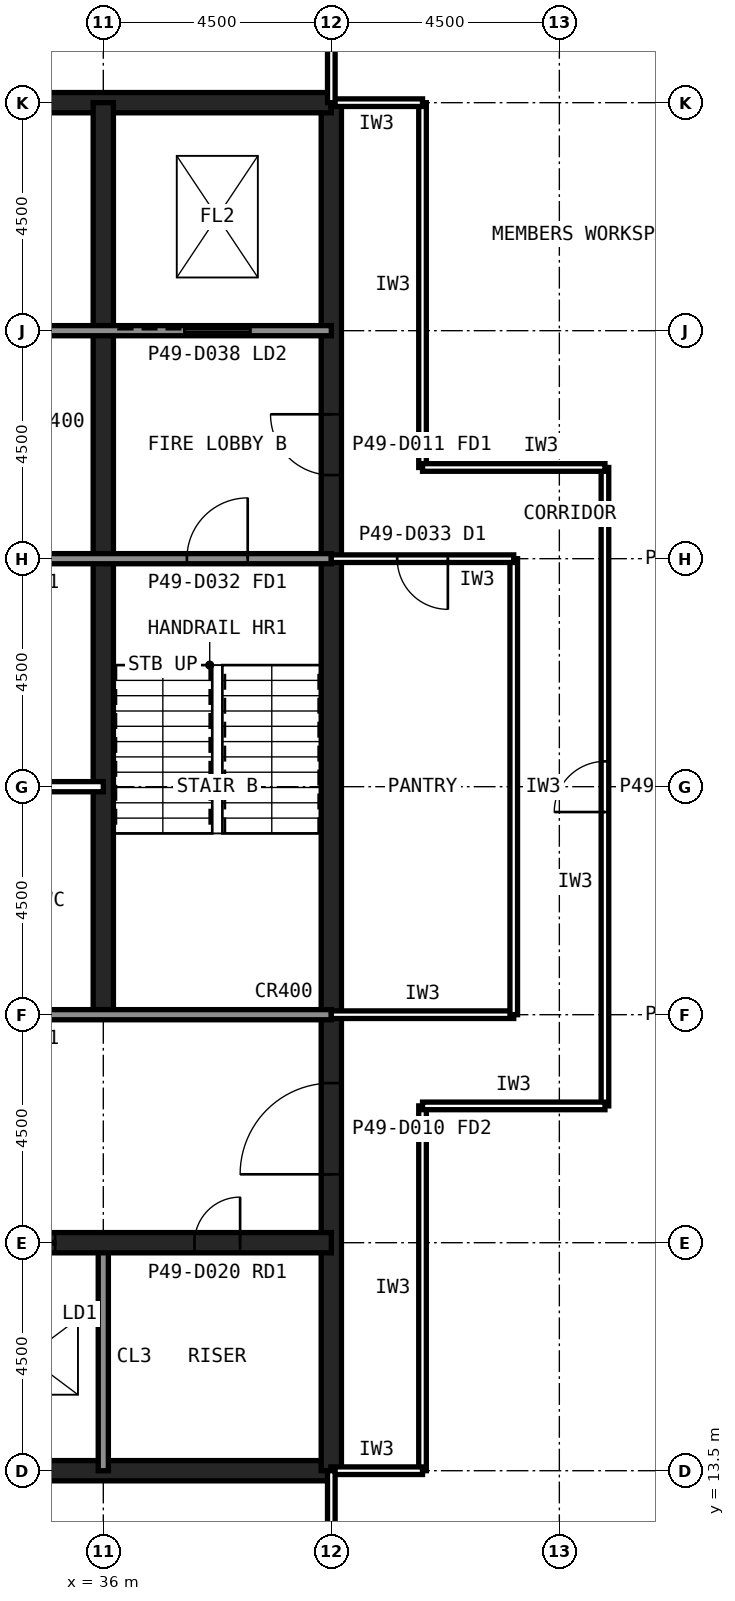
"""IFC4 building model, lengths in metres.
Left out: names, types, materials, properties, quantities, classifications, styles, units other than length and angle.
Written with IfcOpenShell. Run it as: python <this file> out.ifc"""

import sys

from ifc_helpers import new_model, si_unit, direction, frame, frame_2d, origin, place, context, subcontext, project, spatial, rectangle, extrude, element, fill, save


model = new_model("IFC4")
c1 = context("Model", 3, precision=1e-05, world=origin(), true_north=direction((0.0, 1.0)))
c2 = subcontext(c1, "Body", "Model", "MODEL_VIEW")
j1 = project(units=[si_unit("LENGTHUNIT", "METRE"), si_unit("PLANEANGLEUNIT", "RADIAN")], contexts=[c1])
p1 = place(None, origin())
s1 = spatial("IfcSite", under=j1, at=p1, CompositionType="ELEMENT")
p2 = place(p1, origin())
s2 = spatial("IfcBuilding", under=s1, at=p2, CompositionType="ELEMENT")
p3 = place(p2, frame((0.0, 0.0, 210.6)))
s3 = spatial("IfcBuildingStorey", under=s2, at=p3, CompositionType="ELEMENT", Elevation=210.6)
p4 = place(p3, frame((13.5, 13.5, 0.0), z_axis=(0.0, 0.0, 1.0), x_axis=(1.0, 0.0, 0.0)))
e1 = element("IfcWall", 1, at=p4, inside=s3, PredefinedType="SHEAR", context=c2, shape_type="SweptSolid", body=[
    extrude(rectangle(XDim=27.0, YDim=0.4, at=frame_2d((13.5, 0.0))), origin(), (0.0, 0.0, 1.0), 4.0),
])
p5 = place(p3, frame((40.5, 13.5, 0.0), z_axis=(0.0, 0.0, 1.0), x_axis=(0.0, 1.0, 0.0)))
e2 = element("IfcWall", 2, at=p5, inside=s3, PredefinedType="SHEAR", context=c2, shape_type="SweptSolid", body=[
    extrude(rectangle(XDim=27.0, YDim=0.4, at=frame_2d((13.5, 0.0))), origin(), (0.0, 0.0, 1.0), 4.0),
])
p6 = place(p5, frame((5.85, 0.0, 0.0)))
e3 = element("IfcOpeningElement", 3, at=p6, cuts=e2, PredefinedType="OPENING", context=c2, shape_type="SweptSolid", body=[
    extrude(rectangle(XDim=1.8, YDim=2.1, at=frame_2d((0.9, 1.05))), frame((0.0, 0.21, 0.0), z_axis=(0.0, -1.0, 0.0), x_axis=(1.0, 0.0, 0.0)), (0.0, 0.0, 1.0), 0.42),
])
p7 = place(p5, frame((19.65, 0.0, 0.0)))
e4 = element("IfcOpeningElement", 4, at=p7, cuts=e2, PredefinedType="OPENING", context=c2, shape_type="SweptSolid", body=[
    extrude(rectangle(XDim=1.2, YDim=2.1, at=frame_2d((0.6, 1.05))), frame((0.0, 0.21, 0.0), z_axis=(0.0, -1.0, 0.0), x_axis=(1.0, 0.0, 0.0)), (0.0, 0.0, 1.0), 0.42),
])
p8 = place(p3, frame((40.5, 40.5, 0.0), z_axis=(0.0, 0.0, 1.0), x_axis=(-1.0, 0.0, 0.0)))
e5 = element("IfcWall", 5, at=p8, inside=s3, PredefinedType="SHEAR", context=c2, shape_type="SweptSolid", body=[
    extrude(rectangle(XDim=27.0, YDim=0.4, at=frame_2d((13.5, 0.0))), origin(), (0.0, 0.0, 1.0), 4.0),
])
p9 = place(p3, frame((36.0, 13.5, 0.0), z_axis=(0.0, 0.0, 1.0), x_axis=(0.0, 1.0, 0.0)))
e6 = element("IfcWall", 6, at=p9, inside=s3, PredefinedType="SOLIDWALL", context=c2, shape_type="SweptSolid", body=[
    extrude(rectangle(XDim=4.5, YDim=0.2, at=frame_2d((2.25, 0.0))), origin(), (0.0, 0.0, 1.0), 3.84),
])
p10 = place(p3, frame((36.0, 22.5, 0.0), z_axis=(0.0, 0.0, 1.0), x_axis=(0.0, 1.0, 0.0)))
e7 = element("IfcWall", 7, at=p10, inside=s3, PredefinedType="SHEAR", context=c2, shape_type="SweptSolid", body=[
    extrude(rectangle(XDim=18.0, YDim=0.4, at=frame_2d((9.0, 0.0))), origin(), (0.0, 0.0, 1.0), 4.0),
])
p11 = place(p3, frame((13.5, 18.0, 0.0), z_axis=(0.0, 0.0, 1.0), x_axis=(1.0, 0.0, 0.0)))
e8 = element("IfcWall", 8, at=p11, inside=s3, PredefinedType="SHEAR", context=c2, shape_type="SweptSolid", body=[
    extrude(rectangle(XDim=27.0, YDim=0.4, at=frame_2d((13.5, 0.0))), origin(), (0.0, 0.0, 1.0), 4.0),
])
p12 = place(p11, frame((24.3, 0.0, 0.0)))
e9 = element("IfcOpeningElement", 9, at=p12, cuts=e8, PredefinedType="OPENING", context=c2, shape_type="SweptSolid", body=[
    extrude(rectangle(XDim=0.9, YDim=2.1, at=frame_2d((0.45, 1.05))), frame((0.0, 0.21, 0.0), z_axis=(0.0, -1.0, 0.0), x_axis=(1.0, 0.0, 0.0)), (0.0, 0.0, 1.0), 0.42),
])
p13 = place(p11, frame((5.45, 0.0, 0.0)))
e10 = element("IfcOpeningElement", 10, at=p13, cuts=e8, PredefinedType="OPENING", context=c2, shape_type="SweptSolid", body=[
    extrude(rectangle(XDim=1.1, YDim=2.1, at=frame_2d((0.55, 1.05))), frame((0.0, 0.21, 0.0), z_axis=(0.0, -1.0, 0.0), x_axis=(1.0, 0.0, 0.0)), (0.0, 0.0, 1.0), 0.42),
])
p14 = place(p11, frame((8.45, 0.0, 0.0)))
e11 = element("IfcOpeningElement", 11, at=p14, cuts=e8, PredefinedType="OPENING", context=c2, shape_type="SweptSolid", body=[
    extrude(rectangle(XDim=1.1, YDim=2.1, at=frame_2d((0.55, 1.05))), frame((0.0, 0.21, 0.0), z_axis=(0.0, -1.0, 0.0), x_axis=(1.0, 0.0, 0.0)), (0.0, 0.0, 1.0), 0.42),
])
p15 = place(p11, frame((11.45, 0.0, 0.0)))
e12 = element("IfcOpeningElement", 12, at=p15, cuts=e8, PredefinedType="OPENING", context=c2, shape_type="SweptSolid", body=[
    extrude(rectangle(XDim=1.1, YDim=2.1, at=frame_2d((0.55, 1.05))), frame((0.0, 0.21, 0.0), z_axis=(0.0, -1.0, 0.0), x_axis=(1.0, 0.0, 0.0)), (0.0, 0.0, 1.0), 0.42),
])
p16 = place(p11, frame((14.45, 0.0, 0.0)))
e13 = element("IfcOpeningElement", 13, at=p16, cuts=e8, PredefinedType="OPENING", context=c2, shape_type="SweptSolid", body=[
    extrude(rectangle(XDim=1.1, YDim=2.1, at=frame_2d((0.55, 1.05))), frame((0.0, 0.21, 0.0), z_axis=(0.0, -1.0, 0.0), x_axis=(1.0, 0.0, 0.0)), (0.0, 0.0, 1.0), 0.42),
])
p17 = place(p11, frame((17.45, 0.0, 0.0)))
e14 = element("IfcOpeningElement", 14, at=p17, cuts=e8, PredefinedType="OPENING", context=c2, shape_type="SweptSolid", body=[
    extrude(rectangle(XDim=1.1, YDim=2.1, at=frame_2d((0.55, 1.05))), frame((0.0, 0.21, 0.0), z_axis=(0.0, -1.0, 0.0), x_axis=(1.0, 0.0, 0.0)), (0.0, 0.0, 1.0), 0.42),
])
p18 = place(p11, frame((20.45, 0.0, 0.0)))
e15 = element("IfcOpeningElement", 15, at=p18, cuts=e8, PredefinedType="OPENING", context=c2, shape_type="SweptSolid", body=[
    extrude(rectangle(XDim=1.1, YDim=2.1, at=frame_2d((0.55, 1.05))), frame((0.0, 0.21, 0.0), z_axis=(0.0, -1.0, 0.0), x_axis=(1.0, 0.0, 0.0)), (0.0, 0.0, 1.0), 0.42),
])
p19 = place(p11, frame((1.6, 0.0, 0.0)))
e16 = element("IfcOpeningElement", 16, at=p19, cuts=e8, PredefinedType="OPENING", context=c2, shape_type="SweptSolid", body=[
    extrude(rectangle(XDim=1.3, YDim=2.2, at=frame_2d((0.65, 1.1))), frame((0.0, 0.21, 0.0), z_axis=(0.0, -1.0, 0.0), x_axis=(1.0, 0.0, 0.0)), (0.0, 0.0, 1.0), 0.42),
])
p20 = place(p3, frame((13.5, 36.0, 0.0), z_axis=(0.0, 0.0, 1.0), x_axis=(1.0, 0.0, 0.0)))
e17 = element("IfcWall", 17, at=p20, inside=s3, PredefinedType="SOLIDWALL", context=c2, shape_type="SweptSolid", body=[
    extrude(rectangle(XDim=27.0, YDim=0.2, at=frame_2d((13.5, 0.0))), origin(), (0.0, 0.0, 1.0), 3.84),
])
p21 = place(p20, frame((1.8, 0.0, 0.0)))
e18 = element("IfcOpeningElement", 18, at=p21, cuts=e17, PredefinedType="OPENING", context=c2, shape_type="SweptSolid", body=[
    extrude(rectangle(XDim=0.9, YDim=2.1, at=frame_2d((0.45, 1.05))), frame((0.0, 0.11, 0.0), z_axis=(0.0, -1.0, 0.0), x_axis=(1.0, 0.0, 0.0)), (0.0, 0.0, 1.0), 0.22),
])
p22 = place(p20, frame((5.55, 0.0, 0.0)))
e19 = element("IfcOpeningElement", 19, at=p22, cuts=e17, PredefinedType="OPENING", context=c2, shape_type="SweptSolid", body=[
    extrude(rectangle(XDim=0.9, YDim=2.1, at=frame_2d((0.45, 1.05))), frame((0.0, 0.11, 0.0), z_axis=(0.0, -1.0, 0.0), x_axis=(1.0, 0.0, 0.0)), (0.0, 0.0, 1.0), 0.22),
])
p23 = place(p20, frame((8.55, 0.0, 0.0)))
e20 = element("IfcOpeningElement", 20, at=p23, cuts=e17, PredefinedType="OPENING", context=c2, shape_type="SweptSolid", body=[
    extrude(rectangle(XDim=0.9, YDim=2.1, at=frame_2d((0.45, 1.05))), frame((0.0, 0.11, 0.0), z_axis=(0.0, -1.0, 0.0), x_axis=(1.0, 0.0, 0.0)), (0.0, 0.0, 1.0), 0.22),
])
p24 = place(p20, frame((11.55, 0.0, 0.0)))
e21 = element("IfcOpeningElement", 21, at=p24, cuts=e17, PredefinedType="OPENING", context=c2, shape_type="SweptSolid", body=[
    extrude(rectangle(XDim=0.9, YDim=2.1, at=frame_2d((0.45, 1.05))), frame((0.0, 0.11, 0.0), z_axis=(0.0, -1.0, 0.0), x_axis=(1.0, 0.0, 0.0)), (0.0, 0.0, 1.0), 0.22),
])
p25 = place(p20, frame((24.1, 0.0, 0.0)))
e22 = element("IfcOpeningElement", 22, at=p25, cuts=e17, PredefinedType="OPENING", context=c2, shape_type="SweptSolid", body=[
    extrude(rectangle(XDim=1.3, YDim=2.2, at=frame_2d((0.65, 1.1))), frame((0.0, 0.11, 0.0), z_axis=(0.0, -1.0, 0.0), x_axis=(1.0, 0.0, 0.0)), (0.0, 0.0, 1.0), 0.22),
])
p26 = place(p3, frame((13.5, 22.5, 0.0), z_axis=(0.0, 0.0, 1.0), x_axis=(1.0, 0.0, 0.0)))
e23 = element("IfcWall", 23, at=p26, inside=s3, PredefinedType="SOLIDWALL", context=c2, shape_type="SweptSolid", body=[
    extrude(rectangle(XDim=27.0, YDim=0.2, at=frame_2d((13.5, 0.0))), origin(), (0.0, 0.0, 1.0), 3.84),
])
p27 = place(p26, frame((1.65, 0.0, 0.0)))
e24 = element("IfcOpeningElement", 24, at=p27, cuts=e23, PredefinedType="OPENING", context=c2, shape_type="SweptSolid", body=[
    extrude(rectangle(XDim=1.2, YDim=2.1, at=frame_2d((0.6, 1.05))), frame((0.0, 0.11, 0.0), z_axis=(0.0, -1.0, 0.0), x_axis=(1.0, 0.0, 0.0)), (0.0, 0.0, 1.0), 0.22),
])
p28 = place(p26, frame((6.025, 0.0, 0.0)))
e25 = element("IfcOpeningElement", 25, at=p28, cuts=e23, PredefinedType="OPENING", context=c2, shape_type="SweptSolid", body=[
    extrude(rectangle(XDim=1.0, YDim=2.1, at=frame_2d((0.5, 1.05))), frame((0.0, 0.11, 0.0), z_axis=(0.0, -1.0, 0.0), x_axis=(1.0, 0.0, 0.0)), (0.0, 0.0, 1.0), 0.22),
])
p29 = place(p26, frame((10.525, 0.0, 0.0)))
e26 = element("IfcOpeningElement", 26, at=p29, cuts=e23, PredefinedType="OPENING", context=c2, shape_type="SweptSolid", body=[
    extrude(rectangle(XDim=1.0, YDim=2.1, at=frame_2d((0.5, 1.05))), frame((0.0, 0.11, 0.0), z_axis=(0.0, -1.0, 0.0), x_axis=(1.0, 0.0, 0.0)), (0.0, 0.0, 1.0), 0.22),
])
p30 = place(p26, frame((19.75, 0.0, 0.0)))
e27 = element("IfcOpeningElement", 27, at=p30, cuts=e23, PredefinedType="OPENING", context=c2, shape_type="SweptSolid", body=[
    extrude(rectangle(XDim=1.0, YDim=2.1, at=frame_2d((0.5, 1.05))), frame((0.0, 0.11, 0.0), z_axis=(0.0, -1.0, 0.0), x_axis=(1.0, 0.0, 0.0)), (0.0, 0.0, 1.0), 0.22),
])
p31 = place(p26, frame((15.05, 0.0, 0.0)))
e28 = element("IfcOpeningElement", 28, at=p31, cuts=e23, PredefinedType="OPENING", context=c2, shape_type="SweptSolid", body=[
    extrude(rectangle(XDim=1.4, YDim=2.4, at=frame_2d((0.7, 1.2))), frame((0.0, 0.11, 0.0), z_axis=(0.0, -1.0, 0.0), x_axis=(1.0, 0.0, 0.0)), (0.0, 0.0, 1.0), 0.22),
])
p32 = place(p3, frame((13.5, 31.5, 0.0), z_axis=(0.0, 0.0, 1.0), x_axis=(1.0, 0.0, 0.0)))
e29 = element("IfcWall", 29, at=p32, inside=s3, PredefinedType="SOLIDWALL", context=c2, shape_type="SweptSolid", body=[
    extrude(rectangle(XDim=27.0, YDim=0.2, at=frame_2d((13.5, 0.0))), origin(), (0.0, 0.0, 1.0), 3.84),
])
p33 = place(p32, frame((24.15, 0.0, 0.0)))
e30 = element("IfcOpeningElement", 30, at=p33, cuts=e29, PredefinedType="OPENING", context=c2, shape_type="SweptSolid", body=[
    extrude(rectangle(XDim=1.2, YDim=2.1, at=frame_2d((0.6, 1.05))), frame((0.0, 0.11, 0.0), z_axis=(0.0, -1.0, 0.0), x_axis=(1.0, 0.0, 0.0)), (0.0, 0.0, 1.0), 0.22),
])
p34 = place(p32, frame((15.3, 0.0, 0.0)))
e31 = element("IfcOpeningElement", 31, at=p34, cuts=e29, PredefinedType="OPENING", context=c2, shape_type="SweptSolid", body=[
    extrude(rectangle(XDim=0.9, YDim=2.1, at=frame_2d((0.45, 1.05))), frame((0.0, 0.11, 0.0), z_axis=(0.0, -1.0, 0.0), x_axis=(1.0, 0.0, 0.0)), (0.0, 0.0, 1.0), 0.22),
])
p35 = place(p32, frame((19.8, 0.0, 0.0)))
e32 = element("IfcOpeningElement", 32, at=p35, cuts=e29, PredefinedType="OPENING", context=c2, shape_type="SweptSolid", body=[
    extrude(rectangle(XDim=0.9, YDim=2.1, at=frame_2d((0.45, 1.05))), frame((0.0, 0.11, 0.0), z_axis=(0.0, -1.0, 0.0), x_axis=(1.0, 0.0, 0.0)), (0.0, 0.0, 1.0), 0.22),
])
p36 = place(p3, frame((27.0, 27.0, 0.0), z_axis=(0.0, 0.0, 1.0), x_axis=(1.0, 0.0, 0.0)))
e33 = element("IfcWall", 33, at=p36, inside=s3, PredefinedType="PARTITIONING", context=c2, shape_type="SweptSolid", body=[
    extrude(rectangle(XDim=9.0, YDim=0.2, at=frame_2d((4.5, 0.0))), origin(), (0.0, 0.0, 1.0), 3.84),
])
p37 = place(p3, frame((45.9, 20.7, 0.0), z_axis=(0.0, 0.0, 1.0), x_axis=(0.0, 1.0, 0.0)))
e34 = element("IfcWall", 34, at=p37, inside=s3, PredefinedType="PARTITIONING", context=c2, shape_type="SweptSolid", body=[
    extrude(rectangle(XDim=12.6, YDim=0.15, at=frame_2d((6.3, 0.0))), origin(), (0.0, 0.0, 1.0), 3.84),
])
p38 = place(p37, frame((5.8, 0.0, 0.0)))
e35 = element("IfcOpeningElement", 35, at=p38, cuts=e34, PredefinedType="OPENING", context=c2, shape_type="SweptSolid", body=[
    extrude(rectangle(XDim=1.0, YDim=2.1, at=frame_2d((0.5, 1.05))), frame((0.0, 0.085, 0.0), z_axis=(0.0, -1.0, 0.0), x_axis=(1.0, 0.0, 0.0)), (0.0, 0.0, 1.0), 0.17),
])
for number, where, z_axis, x_axis in (
    (36, (42.3, 13.5, 0.0), (0.0, 0.0, 1.0), (0.0, 1.0, 0.0)),
    (37, (42.3, 33.3, 0.0), (0.0, 0.0, 1.0), (0.0, 1.0, 0.0)),
):
    element("IfcWall", number, at=place(p3, frame(where, z_axis=z_axis, x_axis=x_axis)), inside=s3, PredefinedType="PARTITIONING", context=c2, shape_type="SweptSolid", body=[
        extrude(rectangle(XDim=7.2, YDim=0.15, at=frame_2d((3.6, 0.0))), origin(), (0.0, 0.0, 1.0), 3.84),
    ])
for number, where, z_axis, x_axis in (
    (38, (42.3, 20.7, 0.0), (0.0, 0.0, 1.0), (1.0, 0.0, 0.0)),
    (39, (45.9, 33.3, 0.0), (0.0, 0.0, 1.0), (-1.0, 0.0, 0.0)),
):
    element("IfcWall", number, at=place(p3, frame(where, z_axis=z_axis, x_axis=x_axis)), inside=s3, PredefinedType="PARTITIONING", context=c2, shape_type="SweptSolid", body=[
        extrude(rectangle(XDim=3.6, YDim=0.15, at=frame_2d((1.8, 0.0))), origin(), (0.0, 0.0, 1.0), 3.84),
    ])
for number, where, z_axis, x_axis in (
    (40, (40.49, 13.5, 0.0), (0.0, 0.0, 1.0), (1.0, 0.0, 0.0)),
    (41, (42.3, 40.5, 0.0), (0.0, 0.0, 1.0), (-1.0, 0.0, 0.0)),
):
    element("IfcWall", number, at=place(p3, frame(where, z_axis=z_axis, x_axis=x_axis)), inside=s3, PredefinedType="PARTITIONING", context=c2, shape_type="SweptSolid", body=[
        extrude(rectangle(XDim=1.81, YDim=0.15, at=frame_2d((0.905, 0.0))), origin(), (0.0, 0.0, 1.0), 2.989),
    ])
p39 = place(p3, frame((40.5, 22.5, 0.0), z_axis=(0.0, 0.0, 1.0), x_axis=(1.0, 0.0, 0.0)))
e42 = element("IfcWall", 42, at=p39, inside=s3, PredefinedType="PARTITIONING", context=c2, shape_type="SweptSolid", body=[
    extrude(rectangle(XDim=3.6, YDim=0.15, at=frame_2d((1.8, 0.0))), origin(), (0.0, 0.0, 1.0), 2.989),
])
p40 = place(p3, frame((44.1, 22.5, 0.0), z_axis=(0.0, 0.0, 1.0), x_axis=(0.0, 1.0, 0.0)))
e43 = element("IfcWall", 43, at=p40, inside=s3, PredefinedType="PARTITIONING", context=c2, shape_type="SweptSolid", body=[
    extrude(rectangle(XDim=9.0, YDim=0.15, at=frame_2d((4.5, 0.0))), origin(), (0.0, 0.0, 1.0), 3.84),
])
p41 = place(p3, frame((44.1, 31.5, 0.0), z_axis=(0.0, 0.0, 1.0), x_axis=(-1.0, 0.0, 0.0)))
e44 = element("IfcWall", 44, at=p41, inside=s3, PredefinedType="PARTITIONING", context=c2, shape_type="SweptSolid", body=[
    extrude(rectangle(XDim=3.6, YDim=0.15, at=frame_2d((1.8, 0.0))), origin(), (0.0, 0.0, 1.0), 2.989),
])
p42 = place(p41, frame((1.3, 0.0, 0.0)))
e45 = element("IfcOpeningElement", 45, at=p42, cuts=e44, PredefinedType="OPENING", context=c2, shape_type="SweptSolid", body=[
    extrude(rectangle(XDim=1.0, YDim=2.1, at=frame_2d((0.5, 1.05))), frame((0.0, 0.085, 0.0), z_axis=(0.0, -1.0, 0.0), x_axis=(1.0, 0.0, 0.0)), (0.0, 0.0, 1.0), 0.17),
])
p43 = place(p3, frame((40.5, 49.155, 0.0), z_axis=(0.0, 0.0, 1.0), x_axis=(0.0, -1.0, 0.0)))
e46 = element("IfcWall", 46, at=p43, inside=s3, PredefinedType="PARTITIONING", context=c2, shape_type="SweptSolid", body=[
    extrude(rectangle(XDim=8.655, YDim=0.15, at=frame_2d((4.328, 0.0))), origin(), (0.0, 0.0, 1.0), 2.989),
])
p44 = place(p43, frame((3.827, 0.0, 0.0)))
e47 = element("IfcOpeningElement", 47, at=p44, cuts=e46, PredefinedType="OPENING", context=c2, shape_type="SweptSolid", body=[
    extrude(rectangle(XDim=1.0, YDim=2.1, at=frame_2d((0.5, 1.05))), frame((0.0, 0.085, 0.0), z_axis=(0.0, -1.0, 0.0), x_axis=(1.0, 0.0, 0.0)), (0.0, 0.0, 1.0), 0.17),
])
p45 = place(p3, frame((40.5, 4.845, 0.0), z_axis=(0.0, 0.0, 1.0), x_axis=(0.0, 1.0, 0.0)))
e48 = element("IfcWall", 48, at=p45, inside=s3, PredefinedType="PARTITIONING", context=c2, shape_type="SweptSolid", body=[
    extrude(rectangle(XDim=8.655, YDim=0.15, at=frame_2d((4.328, 0.0))), origin(), (0.0, 0.0, 1.0), 2.989),
])
p46 = place(p45, frame((3.827, 0.0, 0.0)))
e49 = element("IfcOpeningElement", 49, at=p46, cuts=e48, PredefinedType="OPENING", context=c2, shape_type="SweptSolid", body=[
    extrude(rectangle(XDim=1.0, YDim=2.1, at=frame_2d((0.5, 1.05))), frame((0.0, 0.085, 0.0), z_axis=(0.0, -1.0, 0.0), x_axis=(1.0, 0.0, 0.0)), (0.0, 0.0, 1.0), 0.17),
])
p47 = place(p6, origin())
e50 = element("IfcDoor", 50, at=p47, inside=s3, OperationType="SINGLE_SWING_LEFT", PredefinedType="DOOR", context=c2, shape_type="SweptSolid", body=[
    extrude(rectangle(XDim=1.8, YDim=2.1, at=frame_2d((0.9, 1.05))), frame((0.0, 0.025, 0.0), z_axis=(0.0, -1.0, 0.0), x_axis=(1.0, 0.0, 0.0)), (0.0, 0.0, 1.0), 0.05),
])
fill(e3, e50)
p48 = place(p7, origin())
e51 = element("IfcDoor", 51, at=p48, inside=s3, OperationType="SINGLE_SWING_RIGHT", PredefinedType="DOOR", context=c2, shape_type="SweptSolid", body=[
    extrude(rectangle(XDim=1.2, YDim=2.1, at=frame_2d((0.6, 1.05))), frame((0.0, 0.025, 0.0), z_axis=(0.0, -1.0, 0.0), x_axis=(1.0, 0.0, 0.0)), (0.0, 0.0, 1.0), 0.05),
])
fill(e4, e51)
p49 = place(p33, origin())
e52 = element("IfcDoor", 52, at=p49, inside=s3, OperationType="SINGLE_SWING_RIGHT", PredefinedType="DOOR", context=c2, shape_type="SweptSolid", body=[
    extrude(rectangle(XDim=1.2, YDim=2.1, at=frame_2d((0.6, 1.05))), frame((0.0, 0.025, 0.0), z_axis=(0.0, -1.0, 0.0), x_axis=(1.0, 0.0, 0.0)), (0.0, 0.0, 1.0), 0.05),
])
fill(e30, e52)
p50 = place(p12, origin())
e53 = element("IfcDoor", 53, at=p50, inside=s3, OperationType="SINGLE_SWING_RIGHT", PredefinedType="DOOR", context=c2, shape_type="SweptSolid", body=[
    extrude(rectangle(XDim=0.9, YDim=2.1, at=frame_2d((0.45, 1.05))), frame((0.0, 0.025, 0.0), z_axis=(0.0, -1.0, 0.0), x_axis=(1.0, 0.0, 0.0)), (0.0, 0.0, 1.0), 0.05),
])
fill(e9, e53)
p51 = place(p18, origin())
e54 = element("IfcDoor", 54, at=p51, inside=s3, OperationType="SLIDING_TO_LEFT", PredefinedType="DOOR", context=c2, shape_type="SweptSolid", body=[
    extrude(rectangle(XDim=1.1, YDim=2.1, at=frame_2d((0.55, 1.05))), frame((0.0, 0.025, 0.0), z_axis=(0.0, -1.0, 0.0), x_axis=(1.0, 0.0, 0.0)), (0.0, 0.0, 1.0), 0.05),
])
fill(e15, e54)
p52 = place(p25, origin())
e55 = element("IfcDoor", 55, at=p52, inside=s3, OperationType="SLIDING_TO_LEFT", PredefinedType="DOOR", context=c2, shape_type="SweptSolid", body=[
    extrude(rectangle(XDim=1.3, YDim=2.2, at=frame_2d((0.65, 1.1))), frame((0.0, 0.025, 0.0), z_axis=(0.0, -1.0, 0.0), x_axis=(1.0, 0.0, 0.0)), (0.0, 0.0, 1.0), 0.05),
])
fill(e22, e55)
p53 = place(p38, origin())
e56 = element("IfcDoor", 56, at=p53, inside=s3, OperationType="SINGLE_SWING_LEFT", PredefinedType="DOOR", context=c2, shape_type="SweptSolid", body=[
    extrude(rectangle(XDim=1.0, YDim=2.1, at=frame_2d((0.5, 1.05))), frame((0.0, 0.025, 0.0), z_axis=(0.0, -1.0, 0.0), x_axis=(1.0, 0.0, 0.0)), (0.0, 0.0, 1.0), 0.05),
])
fill(e35, e56)
p54 = place(p42, origin())
e57 = element("IfcDoor", 57, at=p54, inside=s3, OperationType="SINGLE_SWING_LEFT", PredefinedType="DOOR", context=c2, shape_type="SweptSolid", body=[
    extrude(rectangle(XDim=1.0, YDim=2.1, at=frame_2d((0.5, 1.05))), frame((0.0, 0.025, 0.0), z_axis=(0.0, -1.0, 0.0), x_axis=(1.0, 0.0, 0.0)), (0.0, 0.0, 1.0), 0.05),
])
fill(e45, e57)
save(model, sys.argv[1])
